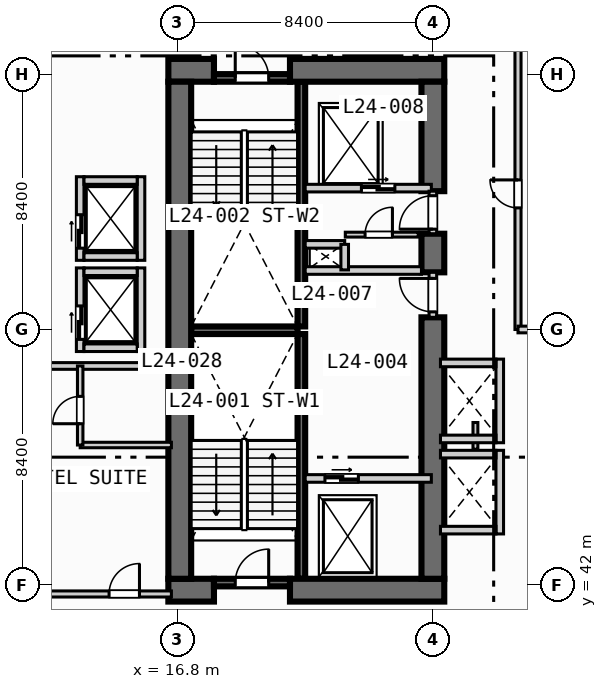
"""IFC4 building model, lengths in metres.
Left out: names, types, materials, properties, quantities, classifications, styles, units other than length and angle.
Written with IfcOpenShell. Run it as: python <this file> out.ifc"""

import sys

from ifc_helpers import new_model, si_unit, direction, frame, frame_2d, origin, place, context, subcontext, project, spatial, rectangle, extrude, element, fill, save


model = new_model("IFC4")
c1 = context("Model", 3, precision=1e-05, world=origin(), true_north=direction((0.0, 1.0)))
c2 = subcontext(c1, "Body", "Model", "MODEL_VIEW")
j1 = project(units=[si_unit("LENGTHUNIT", "METRE"), si_unit("PLANEANGLEUNIT", "RADIAN")], contexts=[c1])
p1 = place(None, origin())
s1 = spatial("IfcSite", under=j1, at=p1, CompositionType="ELEMENT")
p2 = place(p1, origin())
s2 = spatial("IfcBuilding", under=s1, at=p2, CompositionType="ELEMENT")
p3 = place(p2, frame((0.0, 0.0, 103.8)))
s3 = spatial("IfcBuildingStorey", under=s2, at=p3, CompositionType="ELEMENT", Elevation=103.8)
for number, where, z_axis, x_axis in (
    (1, (20.875, 42.2, 0.0), (0.0, 0.0, 1.0), (0.0, 1.0, 0.0)),
    (2, (20.875, 50.5, 0.0), (0.0, 0.0, 1.0), (0.0, 1.0, 0.0)),
):
    element("IfcWall", number, at=place(p3, frame(where, z_axis=z_axis, x_axis=x_axis)), inside=s3, PredefinedType="SOLIDWALL", context=c2, shape_type="SweptSolid", body=[
        extrude(rectangle(XDim=8.05, YDim=0.25, at=frame_2d((4.025, 0.0))), origin(), (0.0, 0.0, 1.0), 3.55),
    ])
p4 = place(p3, frame((17.25, 50.375, 0.0), z_axis=(0.0, 0.0, 1.0), x_axis=(1.0, 0.0, 0.0)))
e3 = element("IfcWall", 3, at=p4, inside=s3, PredefinedType="SOLIDWALL", context=c2, shape_type="SweptSolid", body=[
    extrude(rectangle(XDim=3.5, YDim=0.25, at=frame_2d((1.75, 0.0))), origin(), (0.0, 0.0, 1.0), 3.55),
])
p5 = place(p3, frame((16.5, 41.825, 0.0), z_axis=(0.0, 0.0, 1.0), x_axis=(1.0, 0.0, 0.0)))
e4 = element("IfcWall", 4, at=p5, inside=s3, PredefinedType="SHEAR", context=c2, shape_type="SweptSolid", body=[
    extrude(rectangle(XDim=1.5, YDim=0.75, at=frame_2d((0.75, 0.0))), origin(), (0.0, 0.0, 1.0), 3.55),
])
p6 = place(p3, frame((20.5, 41.825, 0.0), z_axis=(0.0, 0.0, 1.0), x_axis=(1.0, 0.0, 0.0)))
e5 = element("IfcWall", 5, at=p6, inside=s3, PredefinedType="SHEAR", context=c2, shape_type="SweptSolid", body=[
    extrude(rectangle(XDim=5.075, YDim=0.75, at=frame_2d((2.538, 0.0))), origin(), (0.0, 0.0, 1.0), 3.55),
])
p7 = place(p3, frame((16.5, 58.925, 0.0), z_axis=(0.0, 0.0, 1.0), x_axis=(1.0, 0.0, 0.0)))
e6 = element("IfcWall", 6, at=p7, inside=s3, PredefinedType="SHEAR", context=c2, shape_type="SweptSolid", body=[
    extrude(rectangle(XDim=1.5, YDim=0.75, at=frame_2d((0.75, 0.0))), origin(), (0.0, 0.0, 1.0), 3.55),
])
p8 = place(p3, frame((20.5, 58.925, 0.0), z_axis=(0.0, 0.0, 1.0), x_axis=(1.0, 0.0, 0.0)))
e7 = element("IfcWall", 7, at=p8, inside=s3, PredefinedType="SHEAR", context=c2, shape_type="SweptSolid", body=[
    extrude(rectangle(XDim=5.075, YDim=0.75, at=frame_2d((2.538, 0.0))), origin(), (0.0, 0.0, 1.0), 3.55),
])
p9 = place(p3, frame((16.875, 42.2, 0.0), z_axis=(0.0, 0.0, 1.0), x_axis=(0.0, 1.0, 0.0)))
e8 = element("IfcWall", 8, at=p9, inside=s3, PredefinedType="SHEAR", context=c2, shape_type="SweptSolid", body=[
    extrude(rectangle(XDim=16.35, YDim=0.75, at=frame_2d((8.175, 0.0))), origin(), (0.0, 0.0, 1.0), 3.55),
])
p10 = place(p3, frame((25.2, 42.2, 0.0), z_axis=(0.0, 0.0, 1.0), x_axis=(0.0, 1.0, 0.0)))
e9 = element("IfcWall", 9, at=p10, inside=s3, PredefinedType="SHEAR", context=c2, shape_type="SweptSolid", body=[
    extrude(rectangle(XDim=8.6, YDim=0.75, at=frame_2d((4.3, 0.0))), origin(), (0.0, 0.0, 1.0), 3.55),
])
p11 = place(p3, frame((25.2, 52.28, 0.0), z_axis=(0.0, 0.0, 1.0), x_axis=(0.0, 1.0, 0.0)))
e10 = element("IfcWall", 10, at=p11, inside=s3, PredefinedType="SHEAR", context=c2, shape_type="SweptSolid", body=[
    extrude(rectangle(XDim=1.27, YDim=0.75, at=frame_2d((0.635, 0.0))), origin(), (0.0, 0.0, 1.0), 3.55),
])
p12 = place(p3, frame((25.2, 54.95, 0.0), z_axis=(0.0, 0.0, 1.0), x_axis=(0.0, 1.0, 0.0)))
e11 = element("IfcWall", 11, at=p12, inside=s3, PredefinedType="SHEAR", context=c2, shape_type="SweptSolid", body=[
    extrude(rectangle(XDim=3.6, YDim=0.75, at=frame_2d((1.8, 0.0))), origin(), (0.0, 0.0, 1.0), 3.55),
])
p13 = place(p3, frame((18.0, 42.075, 0.0), z_axis=(0.0, 0.0, 1.0), x_axis=(1.0, 0.0, 0.0)))
e12 = element("IfcWall", 12, at=p13, inside=s3, PredefinedType="SOLIDWALL", context=c2, shape_type="SweptSolid", body=[
    extrude(rectangle(XDim=2.5, YDim=0.25, at=frame_2d((1.25, 0.0))), origin(), (0.0, 0.0, 1.0), 3.55),
])
p14 = place(p13, frame((0.7, 0.0, 0.0)))
e13 = element("IfcOpeningElement", 13, at=p14, cuts=e12, PredefinedType="OPENING", context=c2, shape_type="SweptSolid", body=[
    extrude(rectangle(XDim=1.1, YDim=2.15, at=frame_2d((0.55, 1.075))), frame((0.0, 0.135, 0.0), z_axis=(0.0, -1.0, 0.0), x_axis=(1.0, 0.0, 0.0)), (0.0, 0.0, 1.0), 0.27),
])
p15 = place(p3, frame((18.0, 58.675, 0.0), z_axis=(0.0, 0.0, 1.0), x_axis=(1.0, 0.0, 0.0)))
e14 = element("IfcWall", 14, at=p15, inside=s3, PredefinedType="SOLIDWALL", context=c2, shape_type="SweptSolid", body=[
    extrude(rectangle(XDim=2.5, YDim=0.25, at=frame_2d((1.25, 0.0))), origin(), (0.0, 0.0, 1.0), 3.55),
])
p16 = place(p15, frame((0.7, 0.0, 0.0)))
e15 = element("IfcOpeningElement", 15, at=p16, cuts=e14, PredefinedType="OPENING", context=c2, shape_type="SweptSolid", body=[
    extrude(rectangle(XDim=1.1, YDim=2.15, at=frame_2d((0.55, 1.075))), frame((0.0, 0.135, 0.0), z_axis=(0.0, -1.0, 0.0), x_axis=(1.0, 0.0, 0.0)), (0.0, 0.0, 1.0), 0.27),
])
p17 = place(p3, frame((21.0, 45.5, 0.0), z_axis=(0.0, 0.0, 1.0), x_axis=(1.0, 0.0, 0.0)))
e16 = element("IfcWall", 16, at=p17, inside=s3, PredefinedType="SOLIDWALL", context=c2, shape_type="SweptSolid", body=[
    extrude(rectangle(XDim=4.15, YDim=0.25, at=frame_2d((2.075, 0.0))), origin(), (0.0, 0.0, 1.0), 3.55),
])
p18 = place(p17, frame((0.65, 0.0, 0.0)))
e17 = element("IfcOpeningElement", 17, at=p18, cuts=e16, PredefinedType="OPENING", context=c2, shape_type="SweptSolid", body=[
    extrude(rectangle(XDim=1.1, YDim=2.15, at=frame_2d((0.55, 1.075))), frame((0.0, 0.135, 0.0), z_axis=(0.0, -1.0, 0.0), x_axis=(1.0, 0.0, 0.0)), (0.0, 0.0, 1.0), 0.27),
])
p19 = place(p3, frame((25.2, 50.8, 0.0), z_axis=(0.0, 0.0, 1.0), x_axis=(0.0, 1.0, 0.0)))
e18 = element("IfcWall", 18, at=p19, inside=s3, PredefinedType="SOLIDWALL", context=c2, shape_type="SweptSolid", body=[
    extrude(rectangle(XDim=1.48, YDim=0.25, at=frame_2d((0.74, 0.0))), origin(), (0.0, 0.0, 1.0), 3.55),
])
p20 = place(p19, frame((0.18, 0.0, 0.0)))
e19 = element("IfcOpeningElement", 19, at=p20, cuts=e18, PredefinedType="OPENING", context=c2, shape_type="SweptSolid", body=[
    extrude(rectangle(XDim=1.1, YDim=2.15, at=frame_2d((0.55, 1.075))), frame((0.0, 0.135, 0.0), z_axis=(0.0, -1.0, 0.0), x_axis=(1.0, 0.0, 0.0)), (0.0, 0.0, 1.0), 0.27),
])
p21 = place(p3, frame((21.0, 52.34, 0.0), z_axis=(0.0, 0.0, 1.0), x_axis=(1.0, 0.0, 0.0)))
e20 = element("IfcWall", 20, at=p21, inside=s3, PredefinedType="SOLIDWALL", context=c2, shape_type="SweptSolid", body=[
    extrude(rectangle(XDim=3.825, YDim=0.25, at=frame_2d((1.913, 0.0))), origin(), (0.0, 0.0, 1.0), 3.55),
])
p22 = place(p3, frame((21.0, 55.05, 0.0), z_axis=(0.0, 0.0, 1.0), x_axis=(1.0, 0.0, 0.0)))
e21 = element("IfcWall", 21, at=p22, inside=s3, PredefinedType="SOLIDWALL", context=c2, shape_type="SweptSolid", body=[
    extrude(rectangle(XDim=4.15, YDim=0.25, at=frame_2d((2.075, 0.0))), origin(), (0.0, 0.0, 1.0), 3.55),
])
p23 = place(p22, frame((1.85, 0.0, 0.0)))
e22 = element("IfcOpeningElement", 22, at=p23, cuts=e21, PredefinedType="OPENING", context=c2, shape_type="SweptSolid", body=[
    extrude(rectangle(XDim=1.1, YDim=2.15, at=frame_2d((0.55, 1.075))), frame((0.0, 0.135, 0.0), z_axis=(0.0, -1.0, 0.0), x_axis=(1.0, 0.0, 0.0)), (0.0, 0.0, 1.0), 0.27),
])
p24 = place(p3, frame((25.2, 53.55, 0.0), z_axis=(0.0, 0.0, 1.0), x_axis=(0.0, 1.0, 0.0)))
e23 = element("IfcWall", 23, at=p24, inside=s3, PredefinedType="SOLIDWALL", context=c2, shape_type="SweptSolid", body=[
    extrude(rectangle(XDim=1.4, YDim=0.25, at=frame_2d((0.7, 0.0))), origin(), (0.0, 0.0, 1.0), 3.55),
])
p25 = place(p24, frame((0.15, 0.0, 0.0)))
e24 = element("IfcOpeningElement", 24, at=p25, cuts=e23, PredefinedType="OPENING", context=c2, shape_type="SweptSolid", body=[
    extrude(rectangle(XDim=1.1, YDim=2.15, at=frame_2d((0.55, 1.075))), frame((0.0, 0.135, 0.0), z_axis=(0.0, -1.0, 0.0), x_axis=(1.0, 0.0, 0.0)), (0.0, 0.0, 1.0), 0.27),
])
p26 = place(p3, frame((21.0, 53.2, 0.0), z_axis=(0.0, 0.0, 1.0), x_axis=(1.0, 0.0, 0.0)))
e25 = element("IfcWall", 25, at=p26, inside=s3, PredefinedType="SOLIDWALL", context=c2, shape_type="SweptSolid", body=[
    extrude(rectangle(XDim=1.3, YDim=0.25, at=frame_2d((0.65, 0.0))), origin(), (0.0, 0.0, 1.0), 3.55),
])
p27 = place(p3, frame((22.3, 52.36, 0.0), z_axis=(0.0, 0.0, 1.0), x_axis=(0.0, 1.0, 0.0)))
e26 = element("IfcWall", 26, at=p27, inside=s3, PredefinedType="SOLIDWALL", context=c2, shape_type="SweptSolid", body=[
    extrude(rectangle(XDim=0.84, YDim=0.25, at=frame_2d((0.42, 0.0))), origin(), (0.0, 0.0, 1.0), 3.55),
])
p28 = place(p3, frame((22.32, 53.52, 0.0), z_axis=(0.0, 0.0, 1.0), x_axis=(1.0, 0.0, 0.0)))
e27 = element("IfcWall", 27, at=p28, inside=s3, PredefinedType="PARTITIONING", context=c2, shape_type="SweptSolid", body=[
    extrude(rectangle(XDim=2.4, YDim=0.16, at=frame_2d((1.2, 0.0))), origin(), (0.0, 0.0, 1.0), 3.55),
])
p29 = place(p28, frame((0.65, 0.0, 0.0)))
e28 = element("IfcOpeningElement", 28, at=p29, cuts=e27, PredefinedType="OPENING", context=c2, shape_type="SweptSolid", body=[
    extrude(rectangle(XDim=0.9, YDim=2.1, at=frame_2d((0.45, 1.05))), frame((0.0, 0.09, 0.0), z_axis=(0.0, -1.0, 0.0), x_axis=(1.0, 0.0, 0.0)), (0.0, 0.0, 1.0), 0.18),
])
p30 = place(p3, frame((13.6, 49.675, 0.0), z_axis=(0.0, 0.0, 1.0), x_axis=(0.0, 1.0, 0.0)))
e29 = element("IfcWall", 29, at=p30, inside=s3, PredefinedType="SOLIDWALL", context=c2, shape_type="SweptSolid", body=[
    extrude(rectangle(XDim=2.75, YDim=0.25, at=frame_2d((1.375, 0.0))), origin(), (0.0, 0.0, 1.0), 3.55),
])
p31 = place(p30, frame((0.4, 0.0, 0.0)))
e30 = element("IfcOpeningElement", 30, at=p31, cuts=e29, PredefinedType="OPENING", context=c2, shape_type="SweptSolid", body=[
    extrude(rectangle(XDim=1.1, YDim=2.15, at=frame_2d((0.55, 1.075))), frame((0.0, 0.135, 0.0), z_axis=(0.0, -1.0, 0.0), x_axis=(1.0, 0.0, 0.0)), (0.0, 0.0, 1.0), 0.27),
])
p32 = place(p3, frame((15.6, 49.675, 0.0), z_axis=(0.0, 0.0, 1.0), x_axis=(0.0, 1.0, 0.0)))
e31 = element("IfcWall", 31, at=p32, inside=s3, PredefinedType="SOLIDWALL", context=c2, shape_type="SweptSolid", body=[
    extrude(rectangle(XDim=2.75, YDim=0.25, at=frame_2d((1.375, 0.0))), origin(), (0.0, 0.0, 1.0), 3.55),
])
for number, where, z_axis, x_axis in (
    (32, (13.725, 49.8, 0.0), (0.0, 0.0, 1.0), (1.0, 0.0, 0.0)),
    (33, (13.725, 52.3, 0.0), (0.0, 0.0, 1.0), (1.0, 0.0, 0.0)),
):
    element("IfcWall", number, at=place(p3, frame(where, z_axis=z_axis, x_axis=x_axis)), inside=s3, PredefinedType="SOLIDWALL", context=c2, shape_type="SweptSolid", body=[
        extrude(rectangle(XDim=1.75, YDim=0.25, at=frame_2d((0.875, 0.0))), origin(), (0.0, 0.0, 1.0), 3.55),
    ])
p33 = place(p3, frame((13.6, 52.675, 0.0), z_axis=(0.0, 0.0, 1.0), x_axis=(0.0, 1.0, 0.0)))
e34 = element("IfcWall", 34, at=p33, inside=s3, PredefinedType="SOLIDWALL", context=c2, shape_type="SweptSolid", body=[
    extrude(rectangle(XDim=2.75, YDim=0.25, at=frame_2d((1.375, 0.0))), origin(), (0.0, 0.0, 1.0), 3.55),
])
p34 = place(p33, frame((0.4, 0.0, 0.0)))
e35 = element("IfcOpeningElement", 35, at=p34, cuts=e34, PredefinedType="OPENING", context=c2, shape_type="SweptSolid", body=[
    extrude(rectangle(XDim=1.1, YDim=2.15, at=frame_2d((0.55, 1.075))), frame((0.0, 0.135, 0.0), z_axis=(0.0, -1.0, 0.0), x_axis=(1.0, 0.0, 0.0)), (0.0, 0.0, 1.0), 0.27),
])
p35 = place(p3, frame((15.6, 52.675, 0.0), z_axis=(0.0, 0.0, 1.0), x_axis=(0.0, 1.0, 0.0)))
e36 = element("IfcWall", 36, at=p35, inside=s3, PredefinedType="SOLIDWALL", context=c2, shape_type="SweptSolid", body=[
    extrude(rectangle(XDim=2.75, YDim=0.25, at=frame_2d((1.375, 0.0))), origin(), (0.0, 0.0, 1.0), 3.55),
])
for number, where, z_axis, x_axis in (
    (37, (13.725, 52.8, 0.0), (0.0, 0.0, 1.0), (1.0, 0.0, 0.0)),
    (38, (13.725, 55.3, 0.0), (0.0, 0.0, 1.0), (1.0, 0.0, 0.0)),
):
    element("IfcWall", number, at=place(p3, frame(where, z_axis=z_axis, x_axis=x_axis)), inside=s3, PredefinedType="SOLIDWALL", context=c2, shape_type="SweptSolid", body=[
        extrude(rectangle(XDim=1.75, YDim=0.25, at=frame_2d((0.875, 0.0))), origin(), (0.0, 0.0, 1.0), 3.55),
    ])
p36 = place(p3, frame((27.4, 43.675, 0.0), z_axis=(0.0, 0.0, 1.0), x_axis=(0.0, 1.0, 0.0)))
e39 = element("IfcWall", 39, at=p36, inside=s3, PredefinedType="SOLIDWALL", context=c2, shape_type="SweptSolid", body=[
    extrude(rectangle(XDim=2.75, YDim=0.25, at=frame_2d((1.375, 0.0))), origin(), (0.0, 0.0, 1.0), 3.55),
])
for number, where, z_axis, x_axis in (
    (40, (25.45, 43.8, 0.0), (0.0, 0.0, 1.0), (1.0, 0.0, 0.0)),
    (41, (25.45, 46.3, 0.0), (0.0, 0.0, 1.0), (1.0, 0.0, 0.0)),
):
    element("IfcWall", number, at=place(p3, frame(where, z_axis=z_axis, x_axis=x_axis)), inside=s3, PredefinedType="SOLIDWALL", context=c2, shape_type="SweptSolid", body=[
        extrude(rectangle(XDim=1.825, YDim=0.25, at=frame_2d((0.913, 0.0))), origin(), (0.0, 0.0, 1.0), 3.55),
    ])
p37 = place(p3, frame((26.6, 46.46, 0.0), z_axis=(0.0, 0.0, 1.0), x_axis=(0.0, 1.0, 0.0)))
e42 = element("IfcWall", 42, at=p37, inside=s3, PredefinedType="PARTITIONING", context=c2, shape_type="SweptSolid", body=[
    extrude(rectangle(XDim=0.88, YDim=0.16, at=frame_2d((0.44, 0.0))), origin(), (0.0, 0.0, 1.0), 3.55),
])
p38 = place(p3, frame((27.4, 46.675, 0.0), z_axis=(0.0, 0.0, 1.0), x_axis=(0.0, 1.0, 0.0)))
e43 = element("IfcWall", 43, at=p38, inside=s3, PredefinedType="SOLIDWALL", context=c2, shape_type="SweptSolid", body=[
    extrude(rectangle(XDim=2.75, YDim=0.25, at=frame_2d((1.375, 0.0))), origin(), (0.0, 0.0, 1.0), 3.55),
])
for number, where, z_axis, x_axis in (
    (44, (25.45, 46.8, 0.0), (0.0, 0.0, 1.0), (1.0, 0.0, 0.0)),
    (45, (25.45, 49.3, 0.0), (0.0, 0.0, 1.0), (1.0, 0.0, 0.0)),
):
    element("IfcWall", number, at=place(p3, frame(where, z_axis=z_axis, x_axis=x_axis)), inside=s3, PredefinedType="SOLIDWALL", context=c2, shape_type="SweptSolid", body=[
        extrude(rectangle(XDim=1.825, YDim=0.25, at=frame_2d((0.913, 0.0))), origin(), (0.0, 0.0, 1.0), 3.55),
    ])
p39 = place(p3, frame((0.35, 41.7, 0.0), z_axis=(0.0, 0.0, 1.0), x_axis=(1.0, 0.0, 0.0)))
e46 = element("IfcWall", 46, at=p39, inside=s3, PredefinedType="PARTITIONING", context=c2, shape_type="SweptSolid", body=[
    extrude(rectangle(XDim=16.25, YDim=0.2, at=frame_2d((8.125, 0.0))), origin(), (0.0, 0.0, 1.0), 2.8),
])
p40 = place(p39, frame((14.2, 0.0, 0.0)))
e47 = element("IfcOpeningElement", 47, at=p40, cuts=e46, PredefinedType="OPENING", context=c2, shape_type="SweptSolid", body=[
    extrude(rectangle(XDim=1.0, YDim=2.15, at=frame_2d((0.5, 1.075))), frame((0.0, 0.11, 0.0), z_axis=(0.0, -1.0, 0.0), x_axis=(1.0, 0.0, 0.0)), (0.0, 0.0, 1.0), 0.22),
])
p41 = place(p3, frame((0.35, 49.2, 0.0), z_axis=(0.0, 0.0, 1.0), x_axis=(1.0, 0.0, 0.0)))
e48 = element("IfcWall", 48, at=p41, inside=s3, PredefinedType="PARTITIONING", context=c2, shape_type="SweptSolid", body=[
    extrude(rectangle(XDim=16.25, YDim=0.22, at=frame_2d((8.125, 0.0))), origin(), (0.0, 0.0, 1.0), 3.55),
])
p42 = place(p3, frame((13.6, 46.6, 0.0), z_axis=(0.0, 0.0, 1.0), x_axis=(1.0, 0.0, 0.0)))
e49 = element("IfcWall", 49, at=p42, inside=s3, PredefinedType="PLUMBINGWALL", context=c2, shape_type="SweptSolid", body=[
    extrude(rectangle(XDim=3.0, YDim=0.18, at=frame_2d((1.5, 0.0))), origin(), (0.0, 0.0, 1.0), 3.55),
])
p43 = place(p3, frame((13.6, 46.6, 0.0), z_axis=(0.0, 0.0, 1.0), x_axis=(0.0, 1.0, 0.0)))
e50 = element("IfcWall", 50, at=p43, inside=s3, PredefinedType="PLUMBINGWALL", context=c2, shape_type="SweptSolid", body=[
    extrude(rectangle(XDim=2.6, YDim=0.18, at=frame_2d((1.3, 0.0))), origin(), (0.0, 0.0, 1.0), 3.55),
])
p44 = place(p43, frame((0.7, 0.0, 0.0)))
e51 = element("IfcOpeningElement", 51, at=p44, cuts=e50, PredefinedType="OPENING", context=c2, shape_type="SweptSolid", body=[
    extrude(rectangle(XDim=0.9, YDim=2.1, at=frame_2d((0.45, 1.05))), frame((0.0, 0.1, 0.0), z_axis=(0.0, -1.0, 0.0), x_axis=(1.0, 0.0, 0.0)), (0.0, 0.0, 1.0), 0.2),
])
p45 = place(p3, frame((28.0, 50.4, 0.0), z_axis=(0.0, 0.0, 1.0), x_axis=(0.0, 1.0, 0.0)))
e52 = element("IfcWall", 52, at=p45, inside=s3, PredefinedType="PARTITIONING", context=c2, shape_type="SweptSolid", body=[
    extrude(rectangle(XDim=38.6, YDim=0.2, at=frame_2d((19.3, 0.0))), origin(), (0.0, 0.0, 1.0), 3.55),
])
p46 = place(p45, frame((4.0, 0.0, 0.0)))
e53 = element("IfcOpeningElement", 53, at=p46, cuts=e52, PredefinedType="OPENING", context=c2, shape_type="SweptSolid", body=[
    extrude(rectangle(XDim=0.92, YDim=2.1, at=frame_2d((0.46, 1.05))), frame((0.0, 0.11, 0.0), z_axis=(0.0, -1.0, 0.0), x_axis=(1.0, 0.0, 0.0)), (0.0, 0.0, 1.0), 0.22),
])
p47 = place(p3, frame((28.0, 50.4, 0.0), z_axis=(0.0, 0.0, 1.0), x_axis=(1.0, 0.0, 0.0)))
e54 = element("IfcWall", 54, at=p47, inside=s3, PredefinedType="PARTITIONING", context=c2, shape_type="SweptSolid", body=[
    extrude(rectangle(XDim=5.3, YDim=0.22, at=frame_2d((2.65, 0.0))), origin(), (0.0, 0.0, 1.0), 3.087),
])
p48 = place(p14, origin())
e55 = element("IfcDoor", 55, at=p48, inside=s3, OperationType="SINGLE_SWING_RIGHT", PredefinedType="DOOR", context=c2, shape_type="SweptSolid", body=[
    extrude(rectangle(XDim=1.1, YDim=2.15, at=frame_2d((0.55, 1.075))), frame((0.0, 0.025, 0.0), z_axis=(0.0, -1.0, 0.0), x_axis=(1.0, 0.0, 0.0)), (0.0, 0.0, 1.0), 0.05),
])
fill(e13, e55)
p49 = place(p16, origin())
e56 = element("IfcDoor", 56, at=p49, inside=s3, OperationType="SINGLE_SWING_LEFT", PredefinedType="DOOR", context=c2, shape_type="SweptSolid", body=[
    extrude(rectangle(XDim=1.1, YDim=2.15, at=frame_2d((0.55, 1.075))), frame((0.0, 0.025, 0.0), z_axis=(0.0, -1.0, 0.0), x_axis=(1.0, 0.0, 0.0)), (0.0, 0.0, 1.0), 0.05),
])
fill(e15, e56)
p50 = place(p18, origin())
e57 = element("IfcDoor", 57, at=p50, inside=s3, OperationType="SLIDING_TO_LEFT", PredefinedType="DOOR", context=c2, shape_type="SweptSolid", body=[
    extrude(rectangle(XDim=1.1, YDim=2.15, at=frame_2d((0.55, 1.075))), frame((0.0, 0.025, 0.0), z_axis=(0.0, -1.0, 0.0), x_axis=(1.0, 0.0, 0.0)), (0.0, 0.0, 1.0), 0.05),
])
fill(e17, e57)
p51 = place(p20, origin())
e58 = element("IfcDoor", 58, at=p51, inside=s3, OperationType="SINGLE_SWING_RIGHT", PredefinedType="DOOR", context=c2, shape_type="SweptSolid", body=[
    extrude(rectangle(XDim=1.1, YDim=2.15, at=frame_2d((0.55, 1.075))), frame((0.0, 0.025, 0.0), z_axis=(0.0, -1.0, 0.0), x_axis=(1.0, 0.0, 0.0)), (0.0, 0.0, 1.0), 0.05),
])
fill(e19, e58)
p52 = place(p23, origin())
e59 = element("IfcDoor", 59, at=p52, inside=s3, OperationType="SLIDING_TO_LEFT", PredefinedType="DOOR", context=c2, shape_type="SweptSolid", body=[
    extrude(rectangle(XDim=1.1, YDim=2.15, at=frame_2d((0.55, 1.075))), frame((0.0, 0.025, 0.0), z_axis=(0.0, -1.0, 0.0), x_axis=(1.0, 0.0, 0.0)), (0.0, 0.0, 1.0), 0.05),
])
fill(e22, e59)
p53 = place(p25, origin())
e60 = element("IfcDoor", 60, at=p53, inside=s3, OperationType="SINGLE_SWING_LEFT", PredefinedType="DOOR", context=c2, shape_type="SweptSolid", body=[
    extrude(rectangle(XDim=1.1, YDim=2.15, at=frame_2d((0.55, 1.075))), frame((0.0, 0.025, 0.0), z_axis=(0.0, -1.0, 0.0), x_axis=(1.0, 0.0, 0.0)), (0.0, 0.0, 1.0), 0.05),
])
fill(e24, e60)
p54 = place(p29, origin())
e61 = element("IfcDoor", 61, at=p54, inside=s3, OperationType="SINGLE_SWING_RIGHT", PredefinedType="DOOR", context=c2, shape_type="SweptSolid", body=[
    extrude(rectangle(XDim=0.9, YDim=2.1, at=frame_2d((0.45, 1.05))), frame((0.0, 0.025, 0.0), z_axis=(0.0, -1.0, 0.0), x_axis=(1.0, 0.0, 0.0)), (0.0, 0.0, 1.0), 0.05),
])
fill(e28, e61)
p55 = place(p31, origin())
e62 = element("IfcDoor", 62, at=p55, inside=s3, OperationType="SLIDING_TO_LEFT", PredefinedType="DOOR", context=c2, shape_type="SweptSolid", body=[
    extrude(rectangle(XDim=1.1, YDim=2.15, at=frame_2d((0.55, 1.075))), frame((0.0, 0.025, 0.0), z_axis=(0.0, -1.0, 0.0), x_axis=(1.0, 0.0, 0.0)), (0.0, 0.0, 1.0), 0.05),
])
fill(e30, e62)
p56 = place(p34, origin())
e63 = element("IfcDoor", 63, at=p56, inside=s3, OperationType="SLIDING_TO_LEFT", PredefinedType="DOOR", context=c2, shape_type="SweptSolid", body=[
    extrude(rectangle(XDim=1.1, YDim=2.15, at=frame_2d((0.55, 1.075))), frame((0.0, 0.025, 0.0), z_axis=(0.0, -1.0, 0.0), x_axis=(1.0, 0.0, 0.0)), (0.0, 0.0, 1.0), 0.05),
])
fill(e35, e63)
p57 = place(p40, origin())
e64 = element("IfcDoor", 64, at=p57, inside=s3, OperationType="SINGLE_SWING_RIGHT", PredefinedType="DOOR", context=c2, shape_type="SweptSolid", body=[
    extrude(rectangle(XDim=1.0, YDim=2.15, at=frame_2d((0.5, 1.075))), frame((0.0, 0.025, 0.0), z_axis=(0.0, -1.0, 0.0), x_axis=(1.0, 0.0, 0.0)), (0.0, 0.0, 1.0), 0.05),
])
fill(e47, e64)
p58 = place(p44, origin())
e65 = element("IfcDoor", 65, at=p58, inside=s3, OperationType="SINGLE_SWING_LEFT", PredefinedType="DOOR", context=c2, shape_type="SweptSolid", body=[
    extrude(rectangle(XDim=0.9, YDim=2.1, at=frame_2d((0.45, 1.05))), frame((0.0, 0.025, 0.0), z_axis=(0.0, -1.0, 0.0), x_axis=(1.0, 0.0, 0.0)), (0.0, 0.0, 1.0), 0.05),
])
fill(e51, e65)
p59 = place(p46, origin())
e66 = element("IfcDoor", 66, at=p59, inside=s3, OperationType="SINGLE_SWING_RIGHT", PredefinedType="DOOR", context=c2, shape_type="SweptSolid", body=[
    extrude(rectangle(XDim=0.92, YDim=2.1, at=frame_2d((0.46, 1.05))), frame((0.0, 0.025, 0.0), z_axis=(0.0, -1.0, 0.0), x_axis=(1.0, 0.0, 0.0)), (0.0, 0.0, 1.0), 0.05),
])
fill(e53, e66)
save(model, sys.argv[1])
